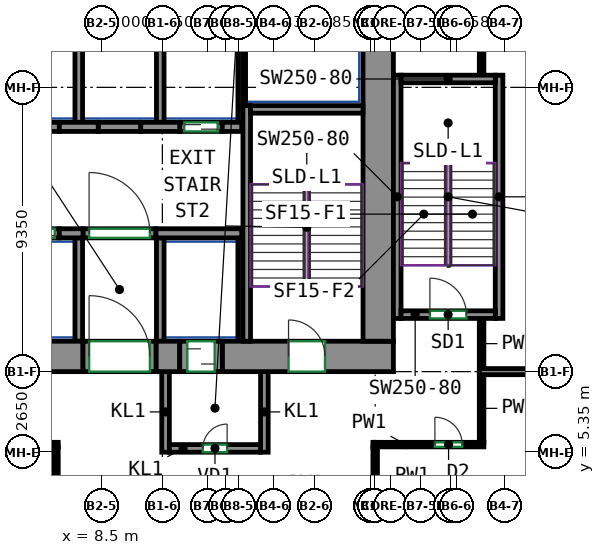
"""IFC4 building model, lengths in metres.
Left out: names, types, materials, properties, quantities, classifications, styles, units other than length and angle.
Written with IfcOpenShell. Run it as: python <this file> out.ifc"""

import sys

from ifc_helpers import new_model, si_unit, direction, frame, frame_2d, origin, place, context, subcontext, project, spatial, rectangle, extrude, source, transform, mapped, element, fill, save


model = new_model("IFC4")
c1 = context("Model", 3, precision=1e-05, world=origin(), true_north=direction((0.0, 1.0)))
c2 = subcontext(c1, "Body", "Model", "MODEL_VIEW")
j1 = project(units=[si_unit("LENGTHUNIT", "METRE"), si_unit("PLANEANGLEUNIT", "RADIAN")], contexts=[c1])
p1 = place(None, origin())
s1 = spatial("IfcSite", under=j1, at=p1, CompositionType="ELEMENT")
p2 = place(p1, origin())
s2 = spatial("IfcBuilding", under=s1, at=p2, CompositionType="ELEMENT")
p3 = place(p2, frame((0.0, 0.0, 9.0)))
s3 = spatial("IfcBuildingStorey", under=s2, at=p3, CompositionType="ELEMENT", Elevation=9.0)
m1 = source(origin(), c2, "Body", "SweptSolid", [
    extrude(rectangle(XDim=14.18, YDim=1.0, at=frame_2d((7.09, 0.0))), origin(), (0.0, 0.0, 1.0), 4.1),
])
p4 = place(p3, frame((-6.29, 8.5, 0.0), z_axis=(0.0, 0.0, 1.0), x_axis=(1.0, 0.0, 0.0)))
e1 = element("IfcWall", 1, at=p4, inside=s3, PredefinedType="SHEAR", context=c2, shape_type="MappedRepresentation", body=[
    mapped(m1, transform((0.0, 0.0, 0.0))),
])
m2 = source(origin(), c2, "Body", "SweptSolid", [
    extrude(rectangle(XDim=0.78, YDim=1.0, at=frame_2d((0.39, 0.0))), origin(), (0.0, 0.0, 1.0), 4.1),
])
p5 = place(p3, frame((10.29, 8.5, 0.0), z_axis=(0.0, 0.0, 1.0), x_axis=(1.0, 0.0, 0.0)))
e2 = element("IfcWall", 2, at=p5, inside=s3, PredefinedType="SHEAR", context=c2, shape_type="MappedRepresentation", body=[
    mapped(m2, transform((0.0, 0.0, 0.0))),
])
m3 = source(origin(), c2, "Body", "SweptSolid", [
    extrude(rectangle(XDim=5.63, YDim=1.0, at=frame_2d((2.815, 0.0))), origin(), (0.0, 0.0, 1.0), 4.1),
])
p6 = place(p3, frame((12.47, 8.5, 0.0), z_axis=(0.0, 0.0, 1.0), x_axis=(1.0, 0.0, 0.0)))
e3 = element("IfcWall", 3, at=p6, inside=s3, PredefinedType="SHEAR", context=c2, shape_type="MappedRepresentation", body=[
    mapped(m3, transform((0.0, 0.0, 0.0))),
])
p7 = place(p6, frame((2.18, 0.0, 0.0)))
e4 = element("IfcOpeningElement", 4, at=p7, cuts=e3, PredefinedType="OPENING", context=c2, shape_type="SweptSolid", body=[
    extrude(rectangle(XDim=1.2, YDim=2.1, at=frame_2d((0.6, 1.05))), frame((0.0, 0.51, 0.0), z_axis=(0.0, -1.0, 0.0), x_axis=(1.0, 0.0, 0.0)), (0.0, 0.0, 1.0), 1.02),
])
m4 = source(origin(), c2, "Body", "SweptSolid", [
    extrude(rectangle(XDim=12.0, YDim=1.0, at=frame_2d((6.0, 0.0))), origin(), (0.0, 0.0, 1.0), 4.1),
])
p8 = place(p3, frame((17.6, 9.0, 0.0), z_axis=(0.0, 0.0, 1.0), x_axis=(0.0, 1.0, 0.0)))
e5 = element("IfcWall", 5, at=p8, inside=s3, PredefinedType="SHEAR", context=c2, shape_type="MappedRepresentation", body=[
    mapped(m4, transform((0.0, 0.0, 0.0))),
])
m5 = source(origin(), c2, "Body", "SweptSolid", [
    extrude(rectangle(XDim=7.75, YDim=0.25, at=frame_2d((3.875, 0.0))), origin(), (0.0, 0.0, 1.0), 4.1),
])
p9 = place(p3, frame((13.275, 9.0, 0.0), z_axis=(0.0, 0.0, 1.0), x_axis=(0.0, 1.0, 0.0)))
e6 = element("IfcWall", 6, at=p9, inside=s3, PredefinedType="SHEAR", context=c2, shape_type="MappedRepresentation", body=[
    mapped(m5, transform((0.0, 0.0, 0.0))),
])
m6 = source(origin(), c2, "Body", "SweptSolid", [
    extrude(rectangle(XDim=3.7, YDim=0.25, at=frame_2d((1.85, 0.0))), origin(), (0.0, 0.0, 1.0), 4.1),
])
p10 = place(p3, frame((13.4, 16.625, 0.0), z_axis=(0.0, 0.0, 1.0), x_axis=(1.0, 0.0, 0.0)))
e7 = element("IfcWall", 7, at=p10, inside=s3, PredefinedType="SHEAR", context=c2, shape_type="MappedRepresentation", body=[
    mapped(m6, transform((0.0, 0.0, 0.0))),
])
m7 = source(origin(), c2, "Body", "SweptSolid", [
    extrude(rectangle(XDim=8.0, YDim=0.25, at=frame_2d((4.0, 0.0))), origin(), (0.0, 0.0, 1.0), 4.1),
])
for number, where, z_axis, x_axis in (
    (8, (18.225, 9.75, 0.0), (0.0, 0.0, 1.0), (0.0, 1.0, 0.0)),
    (9, (21.575, 9.75, 0.0), (0.0, 0.0, 1.0), (0.0, 1.0, 0.0)),
):
    element("IfcWall", number, at=place(p3, frame(where, z_axis=z_axis, x_axis=x_axis)), inside=s3, PredefinedType="SHEAR", context=c2, shape_type="MappedRepresentation", body=[
        mapped(m7, transform((0.0, 0.0, 0.0))),
    ])
m8 = source(origin(), c2, "Body", "SweptSolid", [
    extrude(rectangle(XDim=3.1, YDim=0.25, at=frame_2d((1.55, 0.0))), origin(), (0.0, 0.0, 1.0), 4.1),
])
p11 = place(p3, frame((18.35, 9.875, 0.0), z_axis=(0.0, 0.0, 1.0), x_axis=(1.0, 0.0, 0.0)))
e10 = element("IfcWall", 10, at=p11, inside=s3, PredefinedType="SHEAR", context=c2, shape_type="MappedRepresentation", body=[
    mapped(m8, transform((0.0, 0.0, 0.0))),
])
p12 = place(p11, frame((0.95, 0.0, 0.0)))
e11 = element("IfcOpeningElement", 11, at=p12, cuts=e10, PredefinedType="OPENING", context=c2, shape_type="SweptSolid", body=[
    extrude(rectangle(XDim=1.2, YDim=2.1, at=frame_2d((0.6, 1.05))), frame((0.0, 0.135, 0.0), z_axis=(0.0, -1.0, 0.0), x_axis=(1.0, 0.0, 0.0)), (0.0, 0.0, 1.0), 0.27),
])
p13 = place(p3, frame((18.35, 17.625, 0.0), z_axis=(0.0, 0.0, 1.0), x_axis=(1.0, 0.0, 0.0)))
e12 = element("IfcWall", 12, at=p13, inside=s3, PredefinedType="SHEAR", context=c2, shape_type="MappedRepresentation", body=[
    mapped(m8, transform((0.0, 0.0, 0.0))),
])
m9 = source(origin(), c2, "Body", "SweptSolid", [
    extrude(rectangle(XDim=0.78, YDim=0.3, at=frame_2d((0.39, 0.0))), origin(), (0.0, 0.0, 1.0), 4.1),
])
p14 = place(p3, frame((7.11, 12.55, 0.0), z_axis=(0.0, 0.0, 1.0), x_axis=(1.0, 0.0, 0.0)))
e13 = element("IfcWall", 13, at=p14, inside=s3, PredefinedType="SHEAR", context=c2, shape_type="MappedRepresentation", body=[
    mapped(m9, transform((0.0, 0.0, 0.0))),
])
m10 = source(origin(), c2, "Body", "SweptSolid", [
    extrude(rectangle(XDim=2.82, YDim=0.3, at=frame_2d((1.41, 0.0))), origin(), (0.0, 0.0, 1.0), 4.1),
])
p15 = place(p3, frame((10.29, 12.55, 0.0), z_axis=(0.0, 0.0, 1.0), x_axis=(1.0, 0.0, 0.0)))
e14 = element("IfcWall", 14, at=p15, inside=s3, PredefinedType="SHEAR", context=c2, shape_type="MappedRepresentation", body=[
    mapped(m10, transform((0.0, 0.0, 0.0))),
])
m11 = source(origin(), c2, "Body", "SweptSolid", [
    extrude(rectangle(XDim=1.28, YDim=0.3, at=frame_2d((0.64, 0.0))), origin(), (0.0, 0.0, 1.0), 4.1),
])
p16 = place(p3, frame((7.11, 16.05, 0.0), z_axis=(0.0, 0.0, 1.0), x_axis=(1.0, 0.0, 0.0)))
e15 = element("IfcWall", 15, at=p16, inside=s3, PredefinedType="SHEAR", context=c2, shape_type="MappedRepresentation", body=[
    mapped(m11, transform((0.0, 0.0, 0.0))),
])
m12 = source(origin(), c2, "Body", "SweptSolid", [
    extrude(rectangle(XDim=1.28, YDim=0.3, at=frame_2d((0.64, 0.0))), origin(), (0.0, 0.0, 1.0), 4.1),
])
p17 = place(p3, frame((9.79, 16.05, 0.0), z_axis=(0.0, 0.0, 1.0), x_axis=(1.0, 0.0, 0.0)))
e16 = element("IfcWall", 16, at=p17, inside=s3, PredefinedType="SHEAR", context=c2, shape_type="MappedRepresentation", body=[
    mapped(m12, transform((0.0, 0.0, 0.0))),
])
m13 = source(origin(), c2, "Body", "SweptSolid", [
    extrude(rectangle(XDim=0.64, YDim=0.3, at=frame_2d((0.32, 0.0))), origin(), (0.0, 0.0, 1.0), 4.1),
])
p18 = place(p3, frame((12.47, 16.05, 0.0), z_axis=(0.0, 0.0, 1.0), x_axis=(1.0, 0.0, 0.0)))
e17 = element("IfcWall", 17, at=p18, inside=s3, PredefinedType="SHEAR", context=c2, shape_type="MappedRepresentation", body=[
    mapped(m13, transform((0.0, 0.0, 0.0))),
])
m14 = source(origin(), c2, "Body", "SweptSolid", [
    extrude(rectangle(XDim=1.4, YDim=0.3, at=frame_2d((0.7, 0.0))), origin(), (0.0, 0.0, 1.0), 4.1),
])
p19 = place(p3, frame((5.71, 12.55, 0.0), z_axis=(0.0, 0.0, 1.0), x_axis=(1.0, 0.0, 0.0)))
e18 = element("IfcWall", 18, at=p19, inside=s3, PredefinedType="PARTITIONING", context=c2, shape_type="MappedRepresentation", body=[
    mapped(m14, transform((0.0, 0.0, 0.0))),
])
p20 = place(p19, frame((0.15, 0.0, 0.0)))
e19 = element("IfcOpeningElement", 19, at=p20, cuts=e18, PredefinedType="OPENING", context=c2, shape_type="SweptSolid", body=[
    extrude(rectangle(XDim=1.1, YDim=2.1, at=frame_2d((0.55, 1.05))), frame((0.0, 0.16, 0.0), z_axis=(0.0, -1.0, 0.0), x_axis=(1.0, 0.0, 0.0)), (0.0, 0.0, 1.0), 0.32),
])
m15 = source(origin(), c2, "Body", "SweptSolid", [
    extrude(rectangle(XDim=1.4, YDim=0.3, at=frame_2d((0.7, 0.0))), origin(), (0.0, 0.0, 1.0), 4.1),
])
p21 = place(p3, frame((11.07, 16.05, 0.0), z_axis=(0.0, 0.0, 1.0), x_axis=(1.0, 0.0, 0.0)))
e20 = element("IfcWall", 20, at=p21, inside=s3, PredefinedType="PARTITIONING", context=c2, shape_type="MappedRepresentation", body=[
    mapped(m15, transform((0.0, 0.0, 0.0))),
])
p22 = place(p21, frame((0.15, 0.0, 0.0)))
e21 = element("IfcOpeningElement", 21, at=p22, cuts=e20, PredefinedType="OPENING", context=c2, shape_type="SweptSolid", body=[
    extrude(rectangle(XDim=1.1, YDim=2.1, at=frame_2d((0.55, 1.05))), frame((0.0, 0.16, 0.0), z_axis=(0.0, -1.0, 0.0), x_axis=(1.0, 0.0, 0.0)), (0.0, 0.0, 1.0), 0.32),
])
m16 = source(origin(), c2, "Body", "SweptSolid", [
    extrude(rectangle(XDim=2.4, YDim=0.3, at=frame_2d((1.2, 0.0))), origin(), (0.0, 0.0, 1.0), 4.1),
])
p23 = place(p3, frame((7.89, 12.55, 0.0), z_axis=(0.0, 0.0, 1.0), x_axis=(1.0, 0.0, 0.0)))
e22 = element("IfcWall", 22, at=p23, inside=s3, PredefinedType="PARTITIONING", context=c2, shape_type="MappedRepresentation", body=[
    mapped(m16, transform((0.0, 0.0, 0.0))),
])
p24 = place(p23, frame((0.2, 0.0, 0.0)))
e23 = element("IfcOpeningElement", 23, at=p24, cuts=e22, PredefinedType="OPENING", context=c2, shape_type="SweptSolid", body=[
    extrude(rectangle(XDim=2.0, YDim=2.1, at=frame_2d((1.0, 1.05))), frame((0.0, 0.16, 0.0), z_axis=(0.0, -1.0, 0.0), x_axis=(1.0, 0.0, 0.0)), (0.0, 0.0, 1.0), 0.32),
])
for number, where, z_axis, x_axis in (
    (24, (5.71, 16.05, 0.0), (0.0, 0.0, 1.0), (1.0, 0.0, 0.0)),
    (25, (8.39, 16.05, 0.0), (0.0, 0.0, 1.0), (1.0, 0.0, 0.0)),
):
    element("IfcWall", number, at=place(p3, frame(where, z_axis=z_axis, x_axis=x_axis)), inside=s3, PredefinedType="PARTITIONING", context=c2, shape_type="MappedRepresentation", body=[
        mapped(m14, transform((0.0, 0.0, 0.0))),
    ])
m17 = source(origin(), c2, "Body", "SweptSolid", [
    extrude(rectangle(XDim=2.65, YDim=0.25, at=frame_2d((1.325, 0.0))), origin(), (0.0, 0.0, 1.0), 4.1),
])
for number, where, z_axis, x_axis in (
    (26, (10.605, 5.35, 0.0), (0.0, 0.0, 1.0), (0.0, 1.0, 0.0)),
    (27, (13.855, 5.35, 0.0), (0.0, 0.0, 1.0), (0.0, 1.0, 0.0)),
):
    element("IfcWall", number, at=place(p3, frame(where, z_axis=z_axis, x_axis=x_axis)), inside=s3, PredefinedType="PARTITIONING", context=c2, shape_type="MappedRepresentation", body=[
        mapped(m17, transform((0.0, 0.0, 0.0))),
    ])
m18 = source(origin(), c2, "Body", "SweptSolid", [
    extrude(rectangle(XDim=3.0, YDim=0.25, at=frame_2d((1.5, 0.0))), origin(), (0.0, 0.0, 1.0), 4.1),
])
p25 = place(p3, frame((10.73, 5.475, 0.0), z_axis=(0.0, 0.0, 1.0), x_axis=(1.0, 0.0, 0.0)))
e28 = element("IfcWall", 28, at=p25, inside=s3, PredefinedType="PARTITIONING", context=c2, shape_type="MappedRepresentation", body=[
    mapped(m18, transform((0.0, 0.0, 0.0))),
])
p26 = place(p25, frame((1.1, 0.0, 0.0)))
e29 = element("IfcOpeningElement", 29, at=p26, cuts=e28, PredefinedType="OPENING", context=c2, shape_type="SweptSolid", body=[
    extrude(rectangle(XDim=0.8, YDim=2.0, at=frame_2d((0.4, 1.0))), frame((0.0, 0.135, 0.0), z_axis=(0.0, -1.0, 0.0), x_axis=(1.0, 0.0, 0.0)), (0.0, 0.0, 1.0), 0.27),
])
m19 = source(origin(), c2, "Body", "SweptSolid", [
    extrude(rectangle(XDim=3.275, YDim=0.165, at=frame_2d((1.638, 0.0))), origin(), (0.0, 0.0, 1.0), 4.1),
])
p27 = place(p3, frame((13.067, 16.2, 0.0), z_axis=(0.0, 0.0, 1.0), x_axis=(0.0, 1.0, 0.0)))
e30 = element("IfcWall", 30, at=p27, inside=s3, PredefinedType="PARTITIONING", context=c2, shape_type="MappedRepresentation", body=[
    mapped(m19, transform((0.0, 0.0, 0.0))),
])
m20 = source(origin(), c2, "Body", "SweptSolid", [
    extrude(rectangle(XDim=3.275, YDim=0.25, at=frame_2d((1.638, 0.0))), origin(), (0.0, 0.0, 1.0), 4.1),
])
p28 = place(p3, frame((10.43, 16.2, 0.0), z_axis=(0.0, 0.0, 1.0), x_axis=(0.0, 1.0, 0.0)))
e31 = element("IfcWall", 31, at=p28, inside=s3, PredefinedType="PARTITIONING", context=c2, shape_type="MappedRepresentation", body=[
    mapped(m20, transform((0.0, 0.0, 0.0))),
])
m21 = source(origin(), c2, "Body", "SweptSolid", [
    extrude(rectangle(XDim=2.725, YDim=0.085, at=frame_2d((1.363, 0.0))), origin(), (0.0, 0.0, 1.0), 4.1),
])
p29 = place(p3, frame((13.192, 16.75, 0.0), z_axis=(0.0, 0.0, 1.0), x_axis=(0.0, 1.0, 0.0)))
e32 = element("IfcWall", 32, at=p29, inside=s3, PredefinedType="PARTITIONING", context=c2, shape_type="MappedRepresentation", body=[
    mapped(m21, transform((0.0, 0.0, 0.0))),
])
p30 = place(p3, frame((7.75, 16.2, 0.0), z_axis=(0.0, 0.0, 1.0), x_axis=(0.0, 1.0, 0.0)))
e33 = element("IfcWall", 33, at=p30, inside=s3, PredefinedType="PARTITIONING", context=c2, shape_type="MappedRepresentation", body=[
    mapped(m20, transform((0.0, 0.0, 0.0))),
])
m22 = source(origin(), c2, "Body", "SweptSolid", [
    extrude(rectangle(XDim=3.4, YDim=0.25, at=frame_2d((1.7, 0.0))), origin(), (0.0, 0.0, 1.0), 4.1),
])
p31 = place(p3, frame((10.43, 9.0, 0.0), z_axis=(0.0, 0.0, 1.0), x_axis=(0.0, 1.0, 0.0)))
e34 = element("IfcWall", 34, at=p31, inside=s3, PredefinedType="PARTITIONING", context=c2, shape_type="MappedRepresentation", body=[
    mapped(m22, transform((0.0, 0.0, 0.0))),
])
m23 = source(origin(), c2, "Body", "SweptSolid", [
    extrude(rectangle(XDim=3.4, YDim=0.165, at=frame_2d((1.7, 0.0))), origin(), (0.0, 0.0, 1.0), 4.1),
])
p32 = place(p3, frame((13.067, 9.0, 0.0), z_axis=(0.0, 0.0, 1.0), x_axis=(0.0, 1.0, 0.0)))
e35 = element("IfcWall", 35, at=p32, inside=s3, PredefinedType="PARTITIONING", context=c2, shape_type="MappedRepresentation", body=[
    mapped(m23, transform((0.0, 0.0, 0.0))),
])
p33 = place(p3, frame((7.75, 9.0, 0.0), z_axis=(0.0, 0.0, 1.0), x_axis=(0.0, 1.0, 0.0)))
e36 = element("IfcWall", 36, at=p33, inside=s3, PredefinedType="PARTITIONING", context=c2, shape_type="MappedRepresentation", body=[
    mapped(m22, transform((0.0, 0.0, 0.0))),
])
m24 = source(origin(), c2, "Body", "SweptSolid", [
    extrude(rectangle(XDim=2.4, YDim=1.0, at=frame_2d((1.2, 0.0))), origin(), (0.0, 0.0, 1.0), 2.7),
])
p34 = place(p3, frame((7.89, 8.5, 0.0), z_axis=(0.0, 0.0, 1.0), x_axis=(1.0, 0.0, 0.0)))
e37 = element("IfcWall", 37, at=p34, inside=s3, PredefinedType="PARTITIONING", context=c2, shape_type="MappedRepresentation", body=[
    mapped(m24, transform((0.0, 0.0, 0.0))),
])
p35 = place(p34, frame((0.2, 0.0, 0.0)))
e38 = element("IfcOpeningElement", 38, at=p35, cuts=e37, PredefinedType="OPENING", context=c2, shape_type="SweptSolid", body=[
    extrude(rectangle(XDim=2.0, YDim=2.1, at=frame_2d((1.0, 1.05))), frame((0.0, 0.51, 0.0), z_axis=(0.0, -1.0, 0.0), x_axis=(1.0, 0.0, 0.0)), (0.0, 0.0, 1.0), 1.02),
])
m25 = source(origin(), c2, "Body", "SweptSolid", [
    extrude(rectangle(XDim=1.4, YDim=1.0, at=frame_2d((0.7, 0.0))), origin(), (0.0, 0.0, 1.0), 2.7),
])
p36 = place(p3, frame((11.07, 8.5, 0.0), z_axis=(0.0, 0.0, 1.0), x_axis=(1.0, 0.0, 0.0)))
e39 = element("IfcWall", 39, at=p36, inside=s3, PredefinedType="PARTITIONING", context=c2, shape_type="MappedRepresentation", body=[
    mapped(m25, transform((0.0, 0.0, 0.0))),
])
p37 = place(p36, frame((0.25, 0.0, 0.0)))
e40 = element("IfcOpeningElement", 40, at=p37, cuts=e39, PredefinedType="OPENING", context=c2, shape_type="SweptSolid", body=[
    extrude(rectangle(XDim=0.9, YDim=2.1, at=frame_2d((0.45, 1.05))), frame((0.0, 0.51, 0.0), z_axis=(0.0, -1.0, 0.0), x_axis=(1.0, 0.0, 0.0)), (0.0, 0.0, 1.0), 1.02),
])
p38 = place(p3, frame((-3.575, 5.6, 0.0), z_axis=(0.0, 0.0, 1.0), x_axis=(1.0, 0.0, 0.0)))
e41 = element("IfcWall", 41, at=p38, inside=s3, PredefinedType="PARTITIONING", context=c2, shape_type="SweptSolid", body=[
    extrude(rectangle(XDim=10.65, YDim=0.15, at=frame_2d((5.325, 0.0))), origin(), (0.0, 0.0, 1.0), 4.1),
])
p39 = place(p38, frame((5.985, 0.0, 0.0)))
e42 = element("IfcOpeningElement", 42, at=p39, cuts=e41, PredefinedType="OPENING", context=c2, shape_type="SweptSolid", body=[
    extrude(rectangle(XDim=0.9, YDim=2.1, at=frame_2d((0.45, 1.05))), frame((0.0, 0.085, 0.0), z_axis=(0.0, -1.0, 0.0), x_axis=(1.0, 0.0, 0.0)), (0.0, 0.0, 1.0), 0.17),
])
p40 = place(p3, frame((7.0, 5.525, 0.0), z_axis=(0.0, 0.0, 1.0), x_axis=(0.0, -1.0, 0.0)))
e43 = element("IfcWall", 43, at=p40, inside=s3, PredefinedType="PARTITIONING", context=c2, shape_type="SweptSolid", body=[
    extrude(rectangle(XDim=1.95, YDim=0.15, at=frame_2d((0.975, 0.0))), origin(), (0.0, 0.0, 1.0), 4.1),
])
p41 = place(p3, frame((21.0, 8.09, 0.0), z_axis=(0.0, 0.0, 1.0), x_axis=(0.0, 1.0, 0.0)))
e44 = element("IfcWall", 44, at=p41, inside=s3, PredefinedType="PARTITIONING", context=c2, shape_type="SweptSolid", body=[
    extrude(rectangle(XDim=1.66, YDim=0.15, at=frame_2d((0.83, 0.0))), origin(), (0.0, 0.0, 1.0), 4.1),
])
p42 = place(p3, frame((21.0, 17.75, 0.0), z_axis=(0.0, 0.0, 1.0), x_axis=(0.0, 1.0, 0.0)))
e45 = element("IfcWall", 45, at=p42, inside=s3, PredefinedType="PARTITIONING", context=c2, shape_type="SweptSolid", body=[
    extrude(rectangle(XDim=6.675, YDim=0.15, at=frame_2d((3.337, 0.0))), origin(), (0.0, 0.0, 1.0), 4.1),
])
p43 = place(p3, frame((21.0, 5.675, 0.0), z_axis=(0.0, 0.0, 1.0), x_axis=(0.0, 1.0, 0.0)))
e46 = element("IfcWall", 46, at=p43, inside=s3, PredefinedType="PARTITIONING", context=c2, shape_type="SweptSolid", body=[
    extrude(rectangle(XDim=2.235, YDim=0.15, at=frame_2d((1.117, 0.0))), origin(), (0.0, 0.0, 1.0), 4.1),
])
p44 = place(p3, frame((17.425, 5.6, 0.0), z_axis=(0.0, 0.0, 1.0), x_axis=(1.0, 0.0, 0.0)))
e47 = element("IfcWall", 47, at=p44, inside=s3, PredefinedType="PARTITIONING", context=c2, shape_type="SweptSolid", body=[
    extrude(rectangle(XDim=3.65, YDim=0.15, at=frame_2d((1.825, 0.0))), origin(), (0.0, 0.0, 1.0), 4.1),
])
p45 = place(p44, frame((2.039, 0.0, 0.0)))
e48 = element("IfcOpeningElement", 48, at=p45, cuts=e47, PredefinedType="OPENING", context=c2, shape_type="SweptSolid", body=[
    extrude(rectangle(XDim=0.9, YDim=2.1, at=frame_2d((0.45, 1.05))), frame((0.0, 0.085, 0.0), z_axis=(0.0, -1.0, 0.0), x_axis=(1.0, 0.0, 0.0)), (0.0, 0.0, 1.0), 0.17),
])
p46 = place(p3, frame((17.5, 3.599, 0.0), z_axis=(0.0, 0.0, 1.0), x_axis=(0.0, 1.0, 0.0)))
e49 = element("IfcWall", 49, at=p46, inside=s3, PredefinedType="PARTITIONING", context=c2, shape_type="SweptSolid", body=[
    extrude(rectangle(XDim=1.926, YDim=0.15, at=frame_2d((0.963, 0.0))), origin(), (0.0, 0.0, 1.0), 4.1),
])
p47 = place(p3, frame((20.926, 8.0, 0.0), z_axis=(0.0, 0.0, 1.0), x_axis=(1.0, 0.0, 0.0)))
e50 = element("IfcWall", 50, at=p47, inside=s3, PredefinedType="PARTITIONING", context=c2, shape_type="SweptSolid", body=[
    extrude(rectangle(XDim=3.674, YDim=0.2, at=frame_2d((1.837, 0.0))), origin(), (0.0, 0.0, 1.0), 4.1),
])
p48 = place(p24, origin())
e51 = element("IfcDoor", 51, at=p48, inside=s3, OperationType="DOUBLE_DOOR_SINGLE_SWING", PredefinedType="DOOR", context=c2, shape_type="SweptSolid", body=[
    extrude(rectangle(XDim=2.0, YDim=2.1, at=frame_2d((1.0, 1.05))), frame((0.0, 0.025, 0.0), z_axis=(0.0, -1.0, 0.0), x_axis=(1.0, 0.0, 0.0)), (0.0, 0.0, 1.0), 0.05),
])
fill(e23, e51)
p49 = place(p35, origin())
e52 = element("IfcDoor", 52, at=p49, inside=s3, OperationType="DOUBLE_DOOR_SINGLE_SWING", PredefinedType="DOOR", context=c2, shape_type="SweptSolid", body=[
    extrude(rectangle(XDim=2.0, YDim=2.1, at=frame_2d((1.0, 1.05))), frame((0.0, 0.405, 0.0), z_axis=(0.0, -1.0, 0.0), x_axis=(1.0, 0.0, 0.0)), (0.0, 0.0, 1.0), 0.05),
])
fill(e38, e52)
p50 = place(p26, origin())
e53 = element("IfcDoor", 53, at=p50, inside=s3, OperationType="SINGLE_SWING_RIGHT", PredefinedType="DOOR", context=c2, shape_type="SweptSolid", body=[
    extrude(rectangle(XDim=0.8, YDim=2.0, at=frame_2d((0.4, 1.0))), frame((0.0, 0.025, 0.0), z_axis=(0.0, -1.0, 0.0), x_axis=(1.0, 0.0, 0.0)), (0.0, 0.0, 1.0), 0.05),
])
fill(e29, e53)
p51 = place(p37, origin())
e54 = element("IfcDoor", 54, at=p51, inside=s3, OperationType="SLIDING_TO_LEFT", PredefinedType="DOOR", context=c2, shape_type="SweptSolid", body=[
    extrude(rectangle(XDim=0.9, YDim=2.1, at=frame_2d((0.45, 1.05))), frame((0.0, 0.405, 0.0), z_axis=(0.0, -1.0, 0.0), x_axis=(1.0, 0.0, 0.0)), (0.0, 0.0, 1.0), 0.05),
])
fill(e40, e54)
p52 = place(p20, origin())
e55 = element("IfcDoor", 55, at=p52, inside=s3, OperationType="DOUBLE_DOOR_SLIDING", PredefinedType="DOOR", context=c2, shape_type="SweptSolid", body=[
    extrude(rectangle(XDim=1.1, YDim=2.1, at=frame_2d((0.55, 1.05))), frame((0.0, 0.025, 0.0), z_axis=(0.0, -1.0, 0.0), x_axis=(1.0, 0.0, 0.0)), (0.0, 0.0, 1.0), 0.05),
])
fill(e19, e55)
p53 = place(p22, origin())
e56 = element("IfcDoor", 56, at=p53, inside=s3, OperationType="DOUBLE_DOOR_SLIDING", PredefinedType="DOOR", context=c2, shape_type="SweptSolid", body=[
    extrude(rectangle(XDim=1.1, YDim=2.1, at=frame_2d((0.55, 1.05))), frame((0.0, 0.025, 0.0), z_axis=(0.0, -1.0, 0.0), x_axis=(1.0, 0.0, 0.0)), (0.0, 0.0, 1.0), 0.05),
])
fill(e21, e56)
p54 = place(p7, origin())
e57 = element("IfcDoor", 57, at=p54, inside=s3, OperationType="DOUBLE_DOOR_SINGLE_SWING", PredefinedType="DOOR", context=c2, shape_type="SweptSolid", body=[
    extrude(rectangle(XDim=1.2, YDim=2.1, at=frame_2d((0.6, 1.05))), frame((0.0, 0.405, 0.0), z_axis=(0.0, -1.0, 0.0), x_axis=(1.0, 0.0, 0.0)), (0.0, 0.0, 1.0), 0.05),
])
fill(e4, e57)
p55 = place(p12, origin())
e58 = element("IfcDoor", 58, at=p55, inside=s3, OperationType="DOUBLE_DOOR_SINGLE_SWING", PredefinedType="DOOR", context=c2, shape_type="SweptSolid", body=[
    extrude(rectangle(XDim=1.2, YDim=2.1, at=frame_2d((0.6, 1.05))), frame((0.0, 0.025, 0.0), z_axis=(0.0, -1.0, 0.0), x_axis=(1.0, 0.0, 0.0)), (0.0, 0.0, 1.0), 0.05),
])
fill(e11, e58)
p56 = place(p45, origin())
e59 = element("IfcDoor", 59, at=p56, inside=s3, OperationType="SINGLE_SWING_LEFT", PredefinedType="DOOR", context=c2, shape_type="SweptSolid", body=[
    extrude(rectangle(XDim=0.9, YDim=2.1, at=frame_2d((0.45, 1.05))), frame((0.0, 0.025, 0.0), z_axis=(0.0, -1.0, 0.0), x_axis=(1.0, 0.0, 0.0)), (0.0, 0.0, 1.0), 0.05),
])
fill(e48, e59)
save(model, sys.argv[1])
